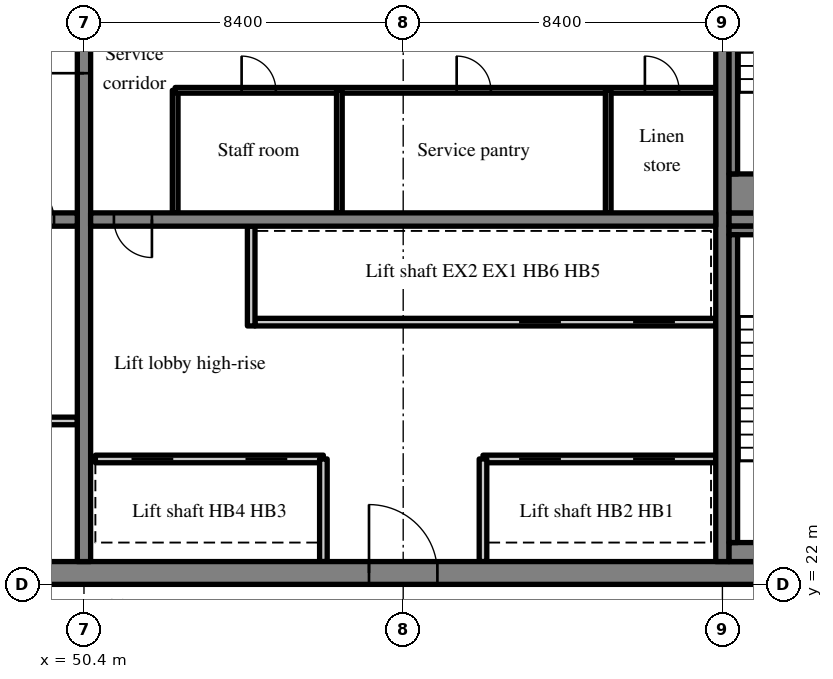
"""IFC4 building model, lengths in metres.
Left out: names, types, materials, properties, quantities, classifications, styles, units other than length and angle.
Written with IfcOpenShell. Run it as: python <this file> out.ifc"""

import sys

from ifc_helpers import new_model, si_unit, direction, frame, frame_2d, origin, place, context, subcontext, project, spatial, rectangle, extrude, source, transform, mapped, element, fill, save


model = new_model("IFC4")
c1 = context("Model", 3, precision=1e-05, world=origin(), true_north=direction((0.0, 1.0)))
c2 = subcontext(c1, "Body", "Model", "MODEL_VIEW")
j1 = project(units=[si_unit("LENGTHUNIT", "METRE"), si_unit("PLANEANGLEUNIT", "RADIAN")], contexts=[c1])
p1 = place(None, origin())
s1 = spatial("IfcSite", under=j1, at=p1, CompositionType="ELEMENT")
p2 = place(p1, origin())
s2 = spatial("IfcBuilding", under=s1, at=p2, CompositionType="ELEMENT")
p3 = place(p2, frame((0.0, 0.0, 214.0)))
s3 = spatial("IfcBuildingStorey", under=s2, at=p3, CompositionType="ELEMENT", Elevation=214.0)
m1 = source(origin(), c2, "Body", "SweptSolid", [
    extrude(rectangle(XDim=50.4, YDim=0.6, at=frame_2d((25.2, 0.0))), origin(), (0.0, 0.0, 1.0), 3.62),
])
p4 = place(p3, frame((25.2, 22.3, 0.0), z_axis=(0.0, 0.0, 1.0), x_axis=(1.0, 0.0, 0.0)))
e1 = element("IfcWall", 1, at=p4, inside=s3, PredefinedType="SHEAR", context=c2, shape_type="MappedRepresentation", body=[
    mapped(m1, transform((0.0, 0.0, 0.0), scale=1.0)),
])
m2 = source(origin(), c2, "Body", "SweptSolid", [
    extrude(rectangle(XDim=1.8, YDim=2.1, at=frame_2d((0.9, 1.05))), frame((0.0, 0.31, 0.0), z_axis=(0.0, -1.0, 0.0), x_axis=(1.0, 0.0, 0.0)), (0.0, 0.0, 1.0), 0.62),
])
p5 = place(p4, frame((15.9, 0.0, 0.0)))
e2 = element("IfcOpeningElement", 2, at=p5, cuts=e1, PredefinedType="OPENING", context=c2, shape_type="MappedRepresentation", body=[
    mapped(m2, transform((0.0, 0.0, 0.0), scale=1.0)),
])
m3 = source(origin(), c2, "Body", "SweptSolid", [
    extrude(rectangle(XDim=0.9, YDim=2.1, at=frame_2d((0.45, 1.05))), frame((0.0, 0.31, 0.0), z_axis=(0.0, -1.0, 0.0), x_axis=(1.0, 0.0, 0.0)), (0.0, 0.0, 1.0), 0.62),
])
p6 = place(p4, frame((9.687, 0.0, 0.0)))
e3 = element("IfcOpeningElement", 3, at=p6, cuts=e1, PredefinedType="OPENING", context=c2, shape_type="MappedRepresentation", body=[
    mapped(m3, transform((0.0, 0.0, 0.0), scale=1.0)),
])
p7 = place(p4, frame((21.513, 0.0, 0.0)))
e4 = element("IfcOpeningElement", 4, at=p7, cuts=e1, PredefinedType="OPENING", context=c2, shape_type="MappedRepresentation", body=[
    mapped(m3, transform((0.0, 0.0, 0.0), scale=1.0)),
])
p8 = place(p4, frame((32.7, 0.0, 0.0)))
e5 = element("IfcOpeningElement", 5, at=p8, cuts=e1, PredefinedType="OPENING", context=c2, shape_type="MappedRepresentation", body=[
    mapped(m2, transform((0.0, 0.0, 0.0), scale=1.0)),
])
m4 = source(origin(), c2, "Body", "SweptSolid", [
    extrude(rectangle(XDim=1.2, YDim=2.1, at=frame_2d((0.6, 1.05))), frame((0.0, 0.31, 0.0), z_axis=(0.0, -1.0, 0.0), x_axis=(1.0, 0.0, 0.0)), (0.0, 0.0, 1.0), 0.62),
])
p9 = place(p4, frame((6.488, 0.0, 0.0)))
e6 = element("IfcOpeningElement", 6, at=p9, cuts=e1, PredefinedType="OPENING", context=c2, shape_type="MappedRepresentation", body=[
    mapped(m4, transform((0.0, 0.0, 0.0), scale=1.0)),
])
p10 = place(p4, frame((47.925, 0.0, 0.0)))
e7 = element("IfcOpeningElement", 7, at=p10, cuts=e1, PredefinedType="OPENING", context=c2, shape_type="MappedRepresentation", body=[
    mapped(m4, transform((0.0, 0.0, 0.0), scale=1.0)),
])
m5 = source(origin(), c2, "Body", "SweptSolid", [
    extrude(rectangle(XDim=18.8, YDim=0.35, at=frame_2d((9.4, 0.0))), origin(), (0.0, 0.0, 1.0), 3.62),
])
p11 = place(p3, frame((50.4, 22.6, 0.0), z_axis=(0.0, 0.0, 1.0), x_axis=(0.0, 1.0, 0.0)))
e8 = element("IfcWall", 8, at=p11, inside=s3, PredefinedType="SHEAR", context=c2, shape_type="MappedRepresentation", body=[
    mapped(m5, transform((0.0, 0.0, 0.0), scale=1.0)),
])
m6 = source(origin(), c2, "Body", "SweptSolid", [
    extrude(rectangle(XDim=1.1, YDim=2.1, at=frame_2d((0.55, 1.05))), frame((0.0, 0.185, 0.0), z_axis=(0.0, -1.0, 0.0), x_axis=(1.0, 0.0, 0.0)), (0.0, 0.0, 1.0), 0.37),
])
p12 = place(p11, frame((12.85, 0.0, 0.0)))
e9 = element("IfcOpeningElement", 9, at=p12, cuts=e8, PredefinedType="OPENING", context=c2, shape_type="MappedRepresentation", body=[
    mapped(m6, transform((0.0, 0.0, 0.0), scale=1.0)),
])
p13 = place(p3, frame((67.2, 22.6, 0.0), z_axis=(0.0, 0.0, 1.0), x_axis=(0.0, 1.0, 0.0)))
e10 = element("IfcWall", 10, at=p13, inside=s3, PredefinedType="SHEAR", context=c2, shape_type="MappedRepresentation", body=[
    mapped(m5, transform((0.0, 0.0, 0.0), scale=1.0)),
])
m7 = source(origin(), c2, "Body", "SweptSolid", [
    extrude(rectangle(XDim=16.45, YDim=0.35, at=frame_2d((8.225, 0.0))), origin(), (0.0, 0.0, 1.0), 3.62),
])
p14 = place(p3, frame((33.775, 31.6, 0.0), z_axis=(0.0, 0.0, 1.0), x_axis=(1.0, 0.0, 0.0)))
e11 = element("IfcWall", 11, at=p14, inside=s3, PredefinedType="SHEAR", context=c2, shape_type="MappedRepresentation", body=[
    mapped(m7, transform((0.0, 0.0, 0.0), scale=1.0)),
])
m8 = source(origin(), c2, "Body", "SweptSolid", [
    extrude(rectangle(XDim=1.0, YDim=2.1, at=frame_2d((0.5, 1.05))), frame((0.0, 0.185, 0.0), z_axis=(0.0, -1.0, 0.0), x_axis=(1.0, 0.0, 0.0)), (0.0, 0.0, 1.0), 0.37),
])
p15 = place(p14, frame((14.837, 0.0, 0.0)))
e12 = element("IfcOpeningElement", 12, at=p15, cuts=e11, PredefinedType="OPENING", context=c2, shape_type="MappedRepresentation", body=[
    mapped(m8, transform((0.0, 0.0, 0.0), scale=1.0)),
])
m9 = source(origin(), c2, "Body", "SweptSolid", [
    extrude(rectangle(XDim=16.45, YDim=0.35, at=frame_2d((8.225, 0.0))), origin(), (0.0, 0.0, 1.0), 3.62),
])
p16 = place(p3, frame((50.575, 31.6, 0.0), z_axis=(0.0, 0.0, 1.0), x_axis=(1.0, 0.0, 0.0)))
e13 = element("IfcWall", 13, at=p16, inside=s3, PredefinedType="SHEAR", context=c2, shape_type="MappedRepresentation", body=[
    mapped(m9, transform((0.0, 0.0, 0.0), scale=1.0)),
])
p17 = place(p16, frame((0.613, 0.0, 0.0)))
e14 = element("IfcOpeningElement", 14, at=p17, cuts=e13, PredefinedType="OPENING", context=c2, shape_type="MappedRepresentation", body=[
    mapped(m8, transform((0.0, 0.0, 0.0), scale=1.0)),
])
m10 = source(origin(), c2, "Body", "SweptSolid", [
    extrude(rectangle(XDim=7.625, YDim=0.35, at=frame_2d((3.812, 0.0))), origin(), (0.0, 0.0, 1.0), 3.62),
])
p18 = place(p3, frame((67.375, 31.6, 0.0), z_axis=(0.0, 0.0, 1.0), x_axis=(1.0, 0.0, 0.0)))
e15 = element("IfcWall", 15, at=p18, inside=s3, PredefinedType="SHEAR", context=c2, shape_type="MappedRepresentation", body=[
    mapped(m10, transform((0.0, 0.0, 0.0), scale=1.0)),
])
p19 = place(p18, frame((5.8, 0.0, 0.0)))
e16 = element("IfcOpeningElement", 16, at=p19, cuts=e15, PredefinedType="OPENING", context=c2, shape_type="MappedRepresentation", body=[
    mapped(m6, transform((0.0, 0.0, 0.0), scale=1.0)),
])
m11 = source(origin(), c2, "Body", "SweptSolid", [
    extrude(rectangle(XDim=6.125, YDim=0.2, at=frame_2d((3.062, 0.0))), origin(), (0.0, 0.0, 1.0), 3.62),
])
p20 = place(p3, frame((44.1, 26.3, 0.0), z_axis=(0.0, 0.0, 1.0), x_axis=(1.0, 0.0, 0.0)))
e17 = element("IfcWall", 17, at=p20, inside=s3, PredefinedType="PARTITIONING", context=c2, shape_type="MappedRepresentation", body=[
    mapped(m11, transform((0.0, 0.0, 0.0), scale=1.0)),
])
p21 = place(p3, frame((67.025, 25.3, 0.0), z_axis=(0.0, 0.0, 1.0), x_axis=(-1.0, 0.0, 0.0)))
e18 = element("IfcWall", 18, at=p21, inside=s3, PredefinedType="SOLIDWALL", context=c2, shape_type="MappedRepresentation", body=[
    mapped(m11, transform((0.0, 0.0, 0.0), scale=1.0)),
])
m12 = source(origin(), c2, "Body", "SweptSolid", [
    extrude(rectangle(XDim=1.1, YDim=2.1, at=frame_2d((0.55, 1.05))), frame((0.0, 0.11, 0.0), z_axis=(0.0, -1.0, 0.0), x_axis=(1.0, 0.0, 0.0)), (0.0, 0.0, 1.0), 0.22),
])
p22 = place(p21, frame((1.075, 0.0, 0.0)))
e19 = element("IfcOpeningElement", 19, at=p22, cuts=e18, PredefinedType="OPENING", context=c2, shape_type="MappedRepresentation", body=[
    mapped(m12, transform((0.0, 0.0, 0.0), scale=1.0)),
])
p23 = place(p21, frame((4.075, 0.0, 0.0)))
e20 = element("IfcOpeningElement", 20, at=p23, cuts=e18, PredefinedType="OPENING", context=c2, shape_type="MappedRepresentation", body=[
    mapped(m12, transform((0.0, 0.0, 0.0), scale=1.0)),
])
m13 = source(origin(), c2, "Body", "SweptSolid", [
    extrude(rectangle(XDim=6.0, YDim=0.2, at=frame_2d((3.0, 0.0))), origin(), (0.0, 0.0, 1.0), 3.62),
])
p24 = place(p3, frame((56.7, 25.3, 0.0), z_axis=(0.0, 0.0, 1.0), x_axis=(-1.0, 0.0, 0.0)))
e21 = element("IfcWall", 21, at=p24, inside=s3, PredefinedType="SOLIDWALL", context=c2, shape_type="MappedRepresentation", body=[
    mapped(m13, transform((0.0, 0.0, 0.0), scale=1.0)),
])
p25 = place(p24, frame((0.95, 0.0, 0.0)))
e22 = element("IfcOpeningElement", 22, at=p25, cuts=e21, PredefinedType="OPENING", context=c2, shape_type="MappedRepresentation", body=[
    mapped(m12, transform((0.0, 0.0, 0.0), scale=1.0)),
])
p26 = place(p24, frame((3.95, 0.0, 0.0)))
e23 = element("IfcOpeningElement", 23, at=p26, cuts=e21, PredefinedType="OPENING", context=c2, shape_type="MappedRepresentation", body=[
    mapped(m12, transform((0.0, 0.0, 0.0), scale=1.0)),
])
m14 = source(origin(), c2, "Body", "SweptSolid", [
    extrude(rectangle(XDim=12.125, YDim=0.2, at=frame_2d((6.062, 0.0))), origin(), (0.0, 0.0, 1.0), 3.62),
])
p27 = place(p3, frame((67.025, 28.9, 0.0), z_axis=(0.0, 0.0, 1.0), x_axis=(-1.0, 0.0, 0.0)))
e24 = element("IfcWall", 24, at=p27, inside=s3, PredefinedType="SOLIDWALL", context=c2, shape_type="MappedRepresentation", body=[
    mapped(m14, transform((0.0, 0.0, 0.0), scale=1.0)),
])
p28 = place(p27, frame((1.075, 0.0, 0.0)))
e25 = element("IfcOpeningElement", 25, at=p28, cuts=e24, PredefinedType="OPENING", context=c2, shape_type="MappedRepresentation", body=[
    mapped(m12, transform((0.0, 0.0, 0.0), scale=1.0)),
])
p29 = place(p27, frame((4.075, 0.0, 0.0)))
e26 = element("IfcOpeningElement", 26, at=p29, cuts=e24, PredefinedType="OPENING", context=c2, shape_type="MappedRepresentation", body=[
    mapped(m12, transform((0.0, 0.0, 0.0), scale=1.0)),
])
m15 = source(origin(), c2, "Body", "SweptSolid", [
    extrude(rectangle(XDim=2.7, YDim=0.2, at=frame_2d((1.35, 0.0))), origin(), (0.0, 0.0, 1.0), 3.62),
])
for number, where, z_axis, x_axis in (
    (27, (60.9, 22.6, 0.0), (0.0, 0.0, 1.0), (0.0, 1.0, 0.0)),
    (28, (56.7, 22.6, 0.0), (0.0, 0.0, 1.0), (0.0, 1.0, 0.0)),
):
    element("IfcWall", number, at=place(p3, frame(where, z_axis=z_axis, x_axis=x_axis)), inside=s3, PredefinedType="SOLIDWALL", context=c2, shape_type="MappedRepresentation", body=[
        mapped(m15, transform((0.0, 0.0, 0.0), scale=1.0)),
    ])
m16 = source(origin(), c2, "Body", "SweptSolid", [
    extrude(rectangle(XDim=2.625, YDim=0.2, at=frame_2d((1.312, 0.0))), origin(), (0.0, 0.0, 1.0), 3.62),
])
p30 = place(p3, frame((54.8, 28.8, 0.0), z_axis=(0.0, 0.0, 1.0), x_axis=(0.0, 1.0, 0.0)))
e29 = element("IfcWall", 29, at=p30, inside=s3, PredefinedType="SOLIDWALL", context=c2, shape_type="MappedRepresentation", body=[
    mapped(m16, transform((0.0, 0.0, 0.0), scale=1.0)),
])
m17 = source(origin(), c2, "Body", "SweptSolid", [
    extrude(rectangle(XDim=3.225, YDim=0.15, at=frame_2d((1.613, 0.0))), origin(), (0.0, 0.0, 1.0), 3.62),
])
p31 = place(p3, frame((52.8, 31.775, 0.0), z_axis=(0.0, 0.0, 1.0), x_axis=(0.0, 1.0, 0.0)))
e30 = element("IfcWall", 30, at=p31, inside=s3, PredefinedType="PARTITIONING", context=c2, shape_type="MappedRepresentation", body=[
    mapped(m17, transform((0.0, 0.0, 0.0), scale=1.0)),
])
m18 = source(origin(), c2, "Body", "SweptSolid", [
    extrude(rectangle(XDim=14.225, YDim=0.15, at=frame_2d((7.112, 0.0))), origin(), (0.0, 0.0, 1.0), 3.62),
])
p32 = place(p3, frame((67.025, 35.0, 0.0), z_axis=(0.0, 0.0, 1.0), x_axis=(-1.0, 0.0, 0.0)))
e31 = element("IfcWall", 31, at=p32, inside=s3, PredefinedType="PARTITIONING", context=c2, shape_type="MappedRepresentation", body=[
    mapped(m18, transform((0.0, 0.0, 0.0), scale=1.0)),
])
m19 = source(origin(), c2, "Body", "SweptSolid", [
    extrude(rectangle(XDim=0.9, YDim=2.1, at=frame_2d((0.45, 1.05))), frame((0.0, 0.085, 0.0), z_axis=(0.0, -1.0, 0.0), x_axis=(1.0, 0.0, 0.0)), (0.0, 0.0, 1.0), 0.17),
])
p33 = place(p32, frame((0.965, 0.0, 0.0)))
e32 = element("IfcOpeningElement", 32, at=p33, cuts=e31, PredefinedType="OPENING", context=c2, shape_type="MappedRepresentation", body=[
    mapped(m19, transform((0.0, 0.0, 0.0), scale=1.0)),
])
p34 = place(p32, frame((5.918, 0.0, 0.0)))
e33 = element("IfcOpeningElement", 33, at=p34, cuts=e31, PredefinedType="OPENING", context=c2, shape_type="MappedRepresentation", body=[
    mapped(m19, transform((0.0, 0.0, 0.0), scale=1.0)),
])
p35 = place(p32, frame((11.577, 0.0, 0.0)))
e34 = element("IfcOpeningElement", 34, at=p35, cuts=e31, PredefinedType="OPENING", context=c2, shape_type="MappedRepresentation", body=[
    mapped(m19, transform((0.0, 0.0, 0.0), scale=1.0)),
])
for number, where, z_axis, x_axis in (
    (35, (64.195, 31.775, 0.0), (0.0, 0.0, 1.0), (0.0, 1.0, 0.0)),
    (36, (57.12, 31.775, 0.0), (0.0, 0.0, 1.0), (0.0, 1.0, 0.0)),
):
    element("IfcWall", number, at=place(p3, frame(where, z_axis=z_axis, x_axis=x_axis)), inside=s3, PredefinedType="PARTITIONING", context=c2, shape_type="MappedRepresentation", body=[
        mapped(m17, transform((0.0, 0.0, 0.0), scale=1.0)),
    ])
m20 = source(origin(), c2, "Body", "SweptSolid", [
    extrude(rectangle(XDim=4.875, YDim=0.5, at=frame_2d((2.438, 0.0))), origin(), (0.0, 0.0, 1.0), 3.62),
])
p36 = place(p3, frame((67.375, 22.85, 0.0), z_axis=(0.0, 0.0, 1.0), x_axis=(1.0, 0.0, 0.0)))
e37 = element("IfcWall", 37, at=p36, inside=s3, PredefinedType="SOLIDWALL", context=c2, shape_type="MappedRepresentation", body=[
    mapped(m20, transform((0.0, 0.0, 0.0), scale=1.0)),
])
m21 = source(origin(), c2, "Body", "SweptSolid", [
    extrude(rectangle(XDim=4.875, YDim=0.225, at=frame_2d((2.438, 0.0))), origin(), (0.0, 0.0, 1.0), 3.62),
])
p37 = place(p3, frame((67.375, 31.312, 0.0), z_axis=(0.0, 0.0, 1.0), x_axis=(1.0, 0.0, 0.0)))
e38 = element("IfcWall", 38, at=p37, inside=s3, PredefinedType="SOLIDWALL", context=c2, shape_type="MappedRepresentation", body=[
    mapped(m21, transform((0.0, 0.0, 0.0), scale=1.0)),
])
m22 = source(origin(), c2, "Body", "SweptSolid", [
    extrude(rectangle(XDim=8.1, YDim=0.225, at=frame_2d((4.05, 0.0))), origin(), (0.0, 0.0, 1.0), 3.62),
])
p38 = place(p3, frame((67.487, 23.1, 0.0), z_axis=(0.0, 0.0, 1.0), x_axis=(0.0, 1.0, 0.0)))
e39 = element("IfcWall", 39, at=p38, inside=s3, PredefinedType="SOLIDWALL", context=c2, shape_type="MappedRepresentation", body=[
    mapped(m22, transform((0.0, 0.0, 0.0), scale=1.0)),
])
m23 = source(origin(), c2, "Body", "SweptSolid", [
    extrude(rectangle(XDim=4.875, YDim=1.025, at=frame_2d((2.438, 0.0))), origin(), (0.0, 0.0, 1.0), 3.62),
])
p39 = place(p3, frame((67.375, 32.287, 0.0), z_axis=(0.0, 0.0, 1.0), x_axis=(1.0, 0.0, 0.0)))
e40 = element("IfcWall", 40, at=p39, inside=s3, PredefinedType="SOLIDWALL", context=c2, shape_type="MappedRepresentation", body=[
    mapped(m23, transform((0.0, 0.0, 0.0), scale=1.0)),
])
p40 = place(p3, frame((67.487, 32.8, 0.0), z_axis=(0.0, 0.0, 1.0), x_axis=(0.0, 1.0, 0.0)))
e41 = element("IfcWall", 41, at=p40, inside=s3, PredefinedType="SOLIDWALL", context=c2, shape_type="MappedRepresentation", body=[
    mapped(m22, transform((0.0, 0.0, 0.0), scale=1.0)),
])
m24 = source(origin(), c2, "Body", "SweptSolid", [
    extrude(rectangle(XDim=1.0, YDim=2.1, at=frame_2d((0.5, 1.05))), frame((0.0, 0.025, 0.0), z_axis=(0.0, -1.0, 0.0), x_axis=(1.0, 0.0, 0.0)), (0.0, 0.0, 1.0), 0.05),
])
p41 = place(p15, origin())
e42 = element("IfcDoor", 42, at=p41, inside=s3, OperationType="SINGLE_SWING_LEFT", PredefinedType="DOOR", context=c2, shape_type="MappedRepresentation", body=[
    mapped(m24, transform((0.0, 0.0, 0.0), scale=1.0)),
])
fill(e12, e42)
m25 = source(origin(), c2, "Body", "SweptSolid", [
    extrude(rectangle(XDim=1.8, YDim=2.1, at=frame_2d((0.9, 1.05))), frame((0.0, 0.225, 0.0), z_axis=(0.0, -1.0, 0.0), x_axis=(1.0, 0.0, 0.0)), (0.0, 0.0, 1.0), 0.05),
])
p42 = place(p8, origin())
e43 = element("IfcDoor", 43, at=p42, inside=s3, OperationType="DOUBLE_DOOR_SINGLE_SWING", PredefinedType="DOOR", context=c2, shape_type="MappedRepresentation", body=[
    mapped(m25, transform((0.0, 0.0, 0.0), scale=1.0)),
])
fill(e5, e43)
p43 = place(p17, origin())
e44 = element("IfcDoor", 44, at=p43, inside=s3, OperationType="SINGLE_SWING_RIGHT", PredefinedType="DOOR", context=c2, shape_type="MappedRepresentation", body=[
    mapped(m24, transform((0.0, 0.0, 0.0), scale=1.0)),
])
fill(e14, e44)
m26 = source(origin(), c2, "Body", "SweptSolid", [
    extrude(rectangle(XDim=1.1, YDim=2.1, at=frame_2d((0.55, 1.05))), frame((0.0, 0.025, 0.0), z_axis=(0.0, -1.0, 0.0), x_axis=(1.0, 0.0, 0.0)), (0.0, 0.0, 1.0), 0.05),
])
p44 = place(p22, origin())
e45 = element("IfcDoor", 45, at=p44, inside=s3, OperationType="SLIDING_TO_RIGHT", PredefinedType="DOOR", context=c2, shape_type="MappedRepresentation", body=[
    mapped(m26, transform((0.0, 0.0, 0.0), scale=1.0)),
])
fill(e19, e45)
p45 = place(p23, origin())
e46 = element("IfcDoor", 46, at=p45, inside=s3, OperationType="SLIDING_TO_LEFT", PredefinedType="DOOR", context=c2, shape_type="MappedRepresentation", body=[
    mapped(m26, transform((0.0, 0.0, 0.0), scale=1.0)),
])
fill(e20, e46)
p46 = place(p25, origin())
e47 = element("IfcDoor", 47, at=p46, inside=s3, OperationType="SLIDING_TO_RIGHT", PredefinedType="DOOR", context=c2, shape_type="MappedRepresentation", body=[
    mapped(m26, transform((0.0, 0.0, 0.0), scale=1.0)),
])
fill(e22, e47)
p47 = place(p26, origin())
e48 = element("IfcDoor", 48, at=p47, inside=s3, OperationType="SLIDING_TO_LEFT", PredefinedType="DOOR", context=c2, shape_type="MappedRepresentation", body=[
    mapped(m26, transform((0.0, 0.0, 0.0), scale=1.0)),
])
fill(e23, e48)
p48 = place(p28, origin())
e49 = element("IfcDoor", 49, at=p48, inside=s3, OperationType="SLIDING_TO_RIGHT", PredefinedType="DOOR", context=c2, shape_type="MappedRepresentation", body=[
    mapped(m26, transform((0.0, 0.0, 0.0), scale=1.0)),
])
fill(e25, e49)
p49 = place(p29, origin())
e50 = element("IfcDoor", 50, at=p49, inside=s3, OperationType="SLIDING_TO_LEFT", PredefinedType="DOOR", context=c2, shape_type="MappedRepresentation", body=[
    mapped(m26, transform((0.0, 0.0, 0.0), scale=1.0)),
])
fill(e26, e50)
m27 = source(origin(), c2, "Body", "SweptSolid", [
    extrude(rectangle(XDim=0.9, YDim=2.1, at=frame_2d((0.45, 1.05))), frame((0.0, 0.025, 0.0), z_axis=(0.0, -1.0, 0.0), x_axis=(1.0, 0.0, 0.0)), (0.0, 0.0, 1.0), 0.05),
])
p50 = place(p33, origin())
e51 = element("IfcDoor", 51, at=p50, inside=s3, OperationType="SINGLE_SWING_RIGHT", PredefinedType="DOOR", context=c2, shape_type="MappedRepresentation", body=[
    mapped(m27, transform((0.0, 0.0, 0.0), scale=1.0)),
])
fill(e32, e51)
p51 = place(p34, origin())
e52 = element("IfcDoor", 52, at=p51, inside=s3, OperationType="SINGLE_SWING_RIGHT", PredefinedType="DOOR", context=c2, shape_type="MappedRepresentation", body=[
    mapped(m27, transform((0.0, 0.0, 0.0), scale=1.0)),
])
fill(e33, e52)
p52 = place(p35, origin())
e53 = element("IfcDoor", 53, at=p52, inside=s3, OperationType="SINGLE_SWING_RIGHT", PredefinedType="DOOR", context=c2, shape_type="MappedRepresentation", body=[
    mapped(m27, transform((0.0, 0.0, 0.0), scale=1.0)),
])
fill(e34, e53)
p53 = place(p12, origin())
e54 = element("IfcDoor", 54, at=p53, inside=s3, OperationType="SINGLE_SWING_LEFT", PredefinedType="DOOR", context=c2, shape_type="MappedRepresentation", body=[
    mapped(m26, transform((0.0, 0.0, 0.0), scale=1.0)),
])
fill(e9, e54)
save(model, sys.argv[1])
